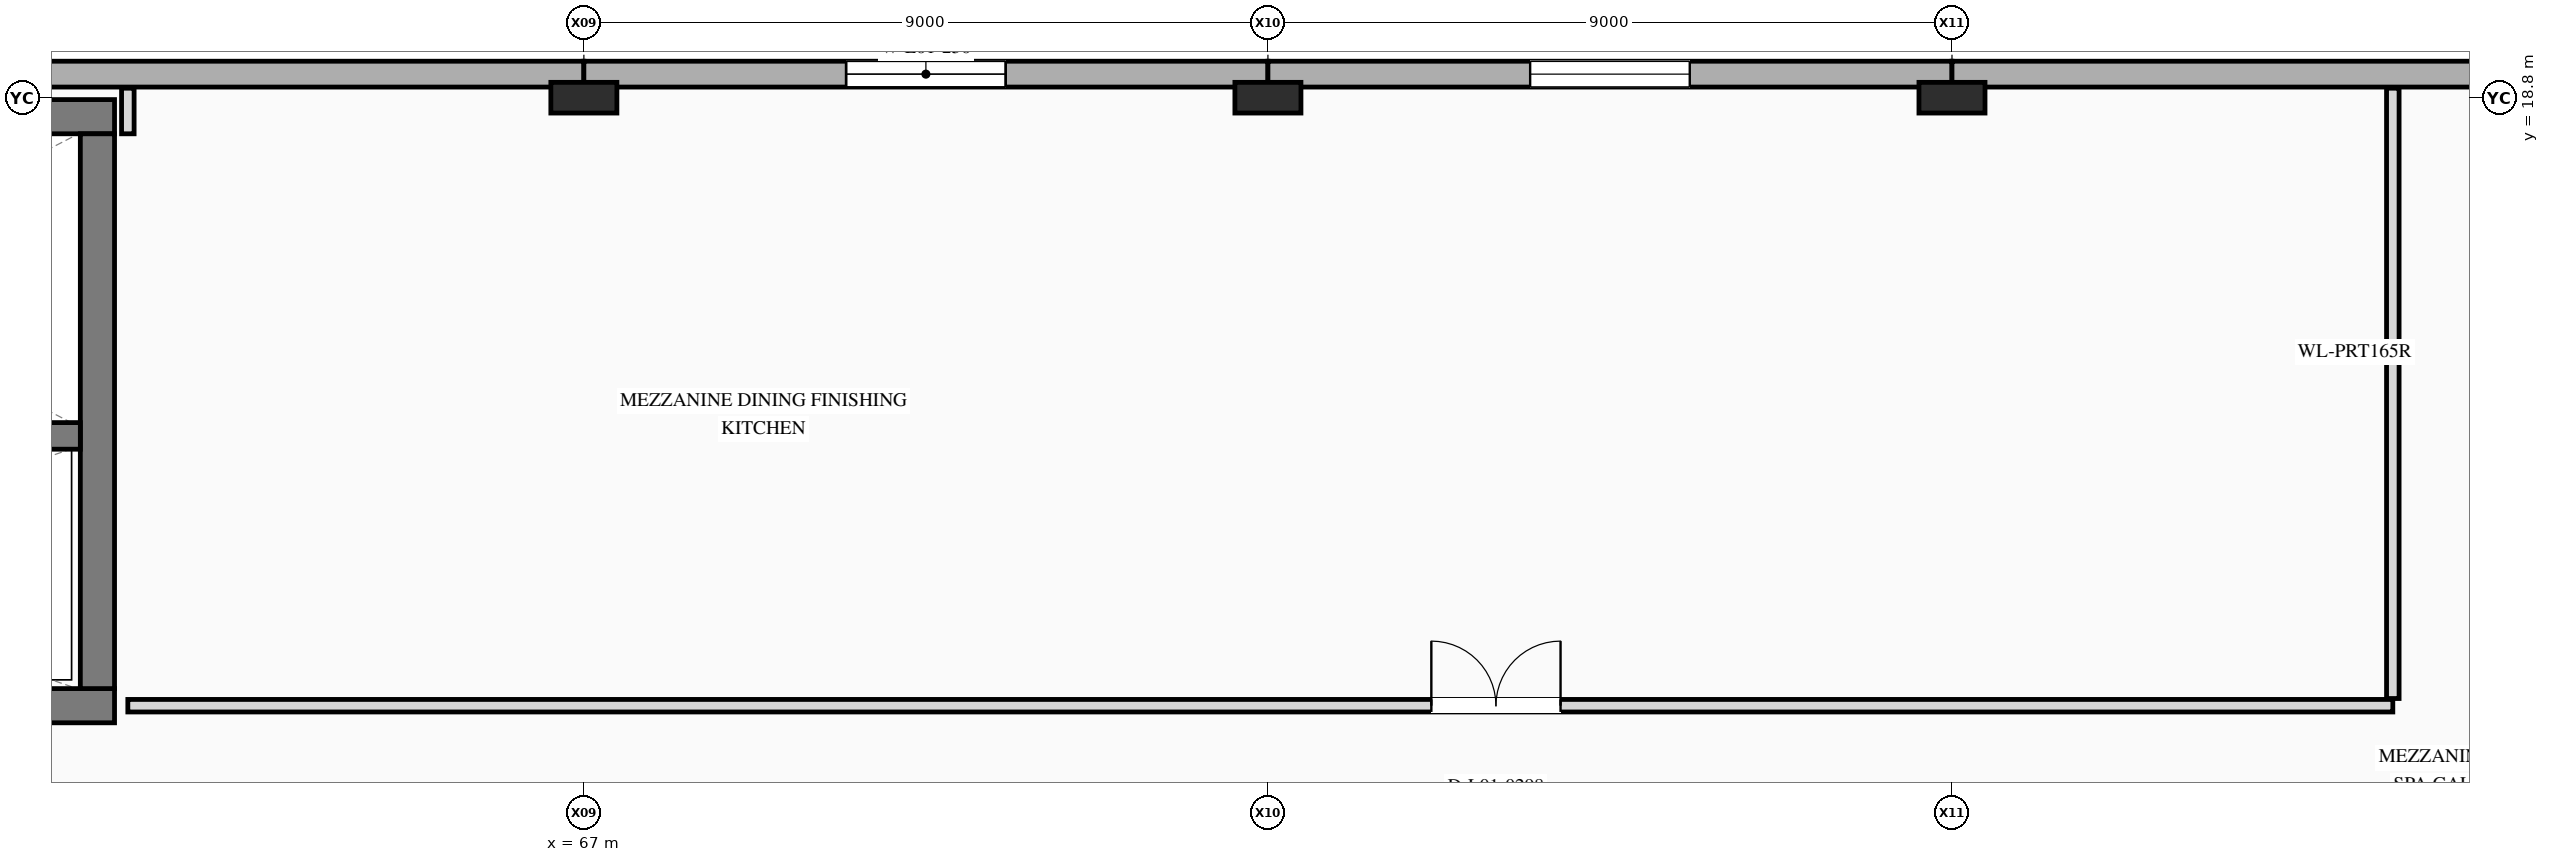
"""IFC4 building model, lengths in metres.
Left out: names, types, materials, properties, quantities, classifications, styles, units other than length and angle.
Written with IfcOpenShell. Run it as: python <this file> out.ifc"""

import sys

from ifc_helpers import new_model, si_unit, direction, frame, frame_2d, origin, origin_2d, place, context, subcontext, project, spatial, rectangle, i_section, extrude, element, fill, save


model = new_model("IFC4")
c1 = context("Model", 3, precision=1e-05, world=origin(), true_north=direction((0.0, 1.0)))
c2 = subcontext(c1, "Body", "Model", "MODEL_VIEW")
j1 = project(units=[si_unit("LENGTHUNIT", "METRE"), si_unit("PLANEANGLEUNIT", "RADIAN")], contexts=[c1])
p1 = place(None, origin())
s1 = spatial("IfcSite", under=j1, at=p1, CompositionType="ELEMENT")
p2 = place(p1, origin())
s2 = spatial("IfcBuilding", under=s1, at=p2, CompositionType="ELEMENT")
p3 = place(p2, frame((0.0, 0.0, 5.4)))
s3 = spatial("IfcBuildingStorey", under=s2, at=p3, CompositionType="ELEMENT", Elevation=5.4)
for number, where, z_axis, x_axis in (
    (1, (67.0, 18.8, 0.0), (0.0, 0.0, 1.0), (0.0, 1.0, 0.0)),
    (2, (76.0, 18.8, 0.0), (0.0, 0.0, 1.0), (0.0, 1.0, 0.0)),
    (3, (85.0, 18.8, 0.0), (0.0, 0.0, 1.0), (0.0, 1.0, 0.0)),
):
    element("IfcColumn", number, at=place(p3, frame(where, z_axis=z_axis, x_axis=x_axis)), inside=s3, PredefinedType="COLUMN", context=c2, shape_type="SweptSolid", body=[
        extrude(i_section(OverallWidth=0.404, OverallDepth=0.869, WebThickness=0.021, FlangeThickness=0.036, at=origin_2d()), origin(), (0.0, 0.0, 1.0), 5.4),
    ])
p4 = place(p3, frame((67.0, 19.11, 0.0), z_axis=(0.0, 0.0, 1.0), x_axis=(-1.0, 0.0, 0.0)))
e4 = element("IfcWall", 4, at=p4, inside=s3, PredefinedType="STANDARD", context=c2, shape_type="SweptSolid", body=[
    extrude(rectangle(XDim=8.545, YDim=0.34, at=frame_2d((4.273, 0.0))), origin(), (0.0, 0.0, 1.0), 5.4),
])
p5 = place(p3, frame((76.0, 19.11, 0.0), z_axis=(0.0, 0.0, 1.0), x_axis=(-1.0, 0.0, 0.0)))
e5 = element("IfcWall", 5, at=p5, inside=s3, PredefinedType="STANDARD", context=c2, shape_type="SweptSolid", body=[
    extrude(rectangle(XDim=9.0, YDim=0.34, at=frame_2d((4.5, 0.0))), origin(), (0.0, 0.0, 1.0), 5.4),
])
p6 = place(p5, frame((3.45, 0.0, 0.88)))
e6 = element("IfcOpeningElement", 6, at=p6, cuts=e5, PredefinedType="OPENING", context=c2, shape_type="SweptSolid", body=[
    extrude(rectangle(XDim=2.1, YDim=1.9, at=frame_2d((1.05, 0.95))), frame((0.0, 0.18, 0.0), z_axis=(0.0, -1.0, 0.0), x_axis=(1.0, 0.0, 0.0)), (0.0, 0.0, 1.0), 0.36),
])
p7 = place(p3, frame((85.0, 19.11, 0.0), z_axis=(0.0, 0.0, 1.0), x_axis=(-1.0, 0.0, 0.0)))
e7 = element("IfcWall", 7, at=p7, inside=s3, PredefinedType="STANDARD", context=c2, shape_type="SweptSolid", body=[
    extrude(rectangle(XDim=9.0, YDim=0.34, at=frame_2d((4.5, 0.0))), origin(), (0.0, 0.0, 1.0), 5.4),
])
p8 = place(p7, frame((3.45, 0.0, 0.88)))
e8 = element("IfcOpeningElement", 8, at=p8, cuts=e7, PredefinedType="OPENING", context=c2, shape_type="SweptSolid", body=[
    extrude(rectangle(XDim=2.1, YDim=1.9, at=frame_2d((1.05, 0.95))), frame((0.0, 0.18, 0.0), z_axis=(0.0, -1.0, 0.0), x_axis=(1.0, 0.0, 0.0)), (0.0, 0.0, 1.0), 0.36),
])
p9 = place(p3, frame((94.0, 19.11, 0.0), z_axis=(0.0, 0.0, 1.0), x_axis=(-1.0, 0.0, 0.0)))
e9 = element("IfcWall", 9, at=p9, inside=s3, PredefinedType="STANDARD", context=c2, shape_type="SweptSolid", body=[
    extrude(rectangle(XDim=9.0, YDim=0.34, at=frame_2d((4.5, 0.0))), origin(), (0.0, 0.0, 1.0), 5.4),
])
p10 = place(p3, frame((50.575, 10.8, 0.0), z_axis=(0.0, 0.0, 1.0), x_axis=(1.0, 0.0, 0.0)))
e10 = element("IfcWall", 10, at=p10, inside=s3, PredefinedType="SHEAR", context=c2, shape_type="SweptSolid", body=[
    extrude(rectangle(XDim=10.25, YDim=0.45, at=frame_2d((5.125, 0.0))), origin(), (0.0, 0.0, 1.0), 5.4),
])
p11 = place(p10, frame((4.675, 0.0, 0.0)))
e11 = element("IfcOpeningElement", 11, at=p11, cuts=e10, PredefinedType="OPENING", context=c2, shape_type="SweptSolid", body=[
    extrude(rectangle(XDim=1.1, YDim=2.2, at=frame_2d((0.55, 1.1))), frame((0.0, 0.235, 0.0), z_axis=(0.0, -1.0, 0.0), x_axis=(1.0, 0.0, 0.0)), (0.0, 0.0, 1.0), 0.47),
])
p12 = place(p3, frame((60.825, 18.55, 0.0), z_axis=(0.0, 0.0, 1.0), x_axis=(-1.0, 0.0, 0.0)))
e12 = element("IfcWall", 12, at=p12, inside=s3, PredefinedType="SHEAR", context=c2, shape_type="SweptSolid", body=[
    extrude(rectangle(XDim=10.25, YDim=0.45, at=frame_2d((5.125, 0.0))), origin(), (0.0, 0.0, 1.0), 5.4),
])
p13 = place(p3, frame((60.6, 11.025, 0.0), z_axis=(0.0, 0.0, 1.0), x_axis=(0.0, 1.0, 0.0)))
e13 = element("IfcWall", 13, at=p13, inside=s3, PredefinedType="SHEAR", context=c2, shape_type="SweptSolid", body=[
    extrude(rectangle(XDim=7.3, YDim=0.45, at=frame_2d((3.65, 0.0))), origin(), (0.0, 0.0, 1.0), 5.4),
])
p14 = place(p3, frame((51.025, 14.35, 0.0), z_axis=(0.0, 0.0, 1.0), x_axis=(1.0, 0.0, 0.0)))
e14 = element("IfcWall", 14, at=p14, inside=s3, PredefinedType="SHEAR", context=c2, shape_type="SweptSolid", body=[
    extrude(rectangle(XDim=9.35, YDim=0.35, at=frame_2d((4.675, 0.0))), origin(), (0.0, 0.0, 1.0), 5.4),
])
p15 = place(p3, frame((61.0, 10.8, 0.0), z_axis=(0.0, 0.0, 1.0), x_axis=(1.0, 0.0, 0.0)))
e15 = element("IfcWall", 15, at=p15, inside=s3, PredefinedType="PARTITIONING", context=c2, shape_type="SweptSolid", body=[
    extrude(rectangle(XDim=29.8, YDim=0.165, at=frame_2d((14.9, 0.0))), origin(), (0.0, 0.0, 1.0), 4.424),
])
p16 = place(p15, frame((17.15, 0.0, 0.0)))
e16 = element("IfcOpeningElement", 16, at=p16, cuts=e15, PredefinedType="OPENING", context=c2, shape_type="SweptSolid", body=[
    extrude(rectangle(XDim=1.7, YDim=2.3, at=frame_2d((0.85, 1.15))), frame((0.0, 0.093, 0.0), z_axis=(0.0, -1.0, 0.0), x_axis=(1.0, 0.0, 0.0)), (0.0, 0.0, 1.0), 0.185),
])
p17 = place(p3, frame((61.0, 18.325, 0.0), z_axis=(0.0, 0.0, 1.0), x_axis=(0.0, 1.0, 0.0)))
e17 = element("IfcWall", 17, at=p17, inside=s3, PredefinedType="PARTITIONING", context=c2, shape_type="SweptSolid", body=[
    extrude(rectangle(XDim=0.6, YDim=0.165, at=frame_2d((0.3, 0.0))), origin(), (0.0, 0.0, 1.0), 5.095),
])
p18 = place(p3, frame((90.8, 10.895, 0.0), z_axis=(0.0, 0.0, 1.0), x_axis=(0.0, 1.0, 0.0)))
e18 = element("IfcWall", 18, at=p18, inside=s3, PredefinedType="PARTITIONING", context=c2, shape_type="SweptSolid", body=[
    extrude(rectangle(XDim=8.031, YDim=0.165, at=frame_2d((4.015, 0.0))), origin(), (0.0, 0.0, 1.0), 5.095),
])
p19 = place(p6, origin())
e19 = element("IfcWindow", 19, at=p19, inside=s3, PartitioningType="SINGLE_PANEL", PredefinedType="WINDOW", context=c2, shape_type="SweptSolid", body=[
    extrude(rectangle(XDim=2.1, YDim=1.9, at=frame_2d((1.05, 0.95))), frame((0.0, 0.03, 0.0), z_axis=(0.0, -1.0, 0.0), x_axis=(1.0, 0.0, 0.0)), (0.0, 0.0, 1.0), 0.06),
])
fill(e6, e19)
p20 = place(p8, origin())
e20 = element("IfcWindow", 20, at=p20, inside=s3, PartitioningType="SINGLE_PANEL", PredefinedType="WINDOW", context=c2, shape_type="SweptSolid", body=[
    extrude(rectangle(XDim=2.1, YDim=1.9, at=frame_2d((1.05, 0.95))), frame((0.0, 0.03, 0.0), z_axis=(0.0, -1.0, 0.0), x_axis=(1.0, 0.0, 0.0)), (0.0, 0.0, 1.0), 0.06),
])
fill(e8, e20)
p21 = place(p16, origin())
e21 = element("IfcDoor", 21, at=p21, inside=s3, OperationType="DOUBLE_DOOR_SINGLE_SWING", PredefinedType="DOOR", context=c2, shape_type="SweptSolid", body=[
    extrude(rectangle(XDim=1.7, YDim=2.3, at=frame_2d((0.85, 1.15))), frame((0.0, 0.025, 0.0), z_axis=(0.0, -1.0, 0.0), x_axis=(1.0, 0.0, 0.0)), (0.0, 0.0, 1.0), 0.05),
])
fill(e16, e21)
save(model, sys.argv[1])
